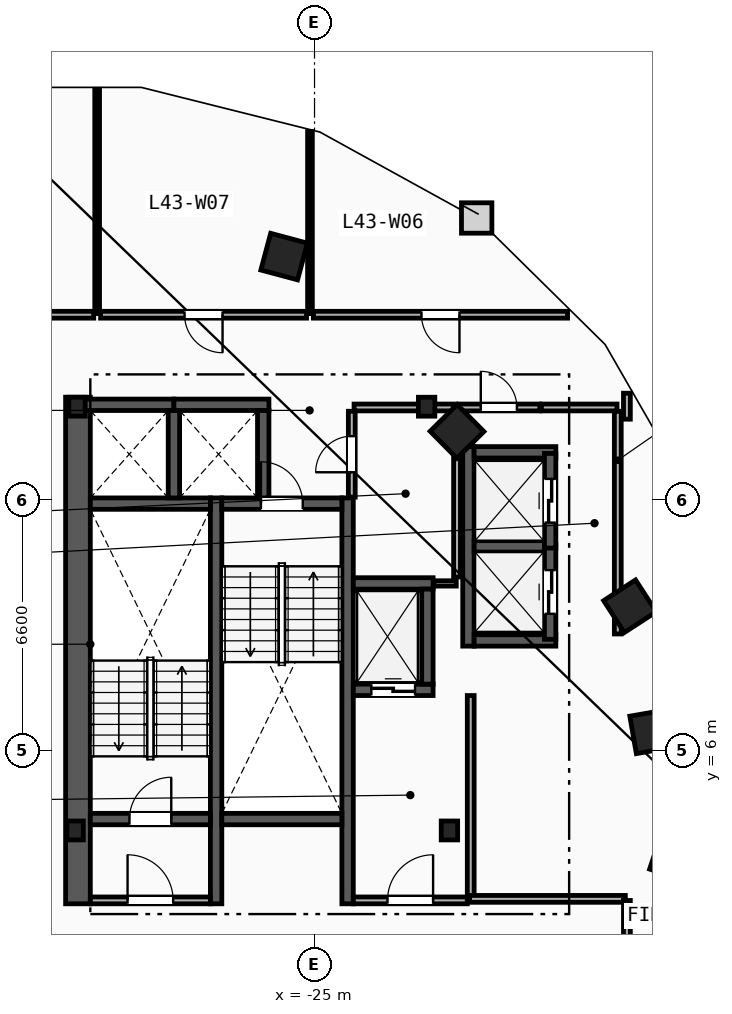
"""IFC4 building model, lengths in metres.
Left out: names, types, materials, properties, quantities, classifications, styles, units other than length and angle.
Written with IfcOpenShell. Run it as: python <this file> out.ifc"""

import sys

from ifc_helpers import new_model, si_unit, direction, frame, frame_2d, origin, origin_2d, place, context, subcontext, project, spatial, rectangle, i_section, extrude, element, fill, save


model = new_model("IFC4")
c1 = context("Model", 3, precision=1e-05, world=origin(), true_north=direction((0.0, 1.0)))
c2 = subcontext(c1, "Body", "Model", "MODEL_VIEW")
j1 = project(units=[si_unit("LENGTHUNIT", "METRE"), si_unit("PLANEANGLEUNIT", "RADIAN")], contexts=[c1])
p1 = place(None, origin())
s1 = spatial("IfcSite", under=j1, at=p1, CompositionType="ELEMENT")
p2 = place(p1, origin())
s2 = spatial("IfcBuilding", under=s1, at=p2, CompositionType="ELEMENT")
p3 = place(p2, frame((0.0, 0.0, 165.6)))
s3 = spatial("IfcBuildingStorey", under=s2, at=p3, CompositionType="ELEMENT", Elevation=165.6)
for number, where, z_axis, x_axis in (
    (1, (-31.3, 3.9, 0.0), (0.0, 0.0, 1.0), (1.0, 0.0, 0.0)),
    (2, (-21.45, 3.9, 0.0), (0.0, 0.0, 1.0), (1.0, 0.0, 0.0)),
    (3, (-22.05, 15.05, 0.0), (0.0, 0.0, 1.0), (1.0, 0.0, 0.0)),
    (4, (-31.25, 15.05, 0.0), (0.0, 0.0, 1.0), (1.0, 0.0, 0.0)),
):
    element("IfcColumn", number, at=place(p3, frame(where, z_axis=z_axis, x_axis=x_axis)), inside=s3, PredefinedType="COLUMN", context=c2, shape_type="SweptSolid", body=[
        extrude(i_section(OverallWidth=0.432, OverallDepth=0.498, WebThickness=0.056, FlangeThickness=0.089, FilletRadius=0.018, at=origin_2d()), origin(), (0.0, 0.0, 1.0), 3.6),
    ])
for number, where, z_axis, x_axis in (
    (5, (-15.55, 3.2, 0.0), (0.0, 0.0, 1.0), (0.315, 0.949, 0.0)),
    (6, (-16.125, 6.5, 0.0), (0.0, 0.0, 1.0), (-0.172, 0.985, 0.0)),
    (7, (-16.7, 9.8, 0.0), (0.0, 0.0, 1.0), (-0.544, 0.839, 0.0)),
    (8, (-21.25, 14.4, 0.0), (0.0, 0.0, 1.0), (-0.703, 0.711, 0.0)),
    (9, (-25.8, 19.0, 0.0), (0.0, 0.0, 1.0), (-0.966, 0.259, 0.0)),
):
    element("IfcColumn", number, at=place(p3, frame(where, z_axis=z_axis, x_axis=x_axis)), inside=s3, PredefinedType="COLUMN", context=c2, shape_type="SweptSolid", body=[
        extrude(rectangle(XDim=1.0, YDim=1.0, at=origin_2d()), origin(), (0.0, 0.0, 1.0), 3.6),
    ])
p4 = place(p3, frame((-31.225, 1.97, 0.0), z_axis=(0.0, 0.0, 1.0), x_axis=(0.0, 1.0, 0.0)))
e10 = element("IfcWall", 10, at=p4, inside=s3, PredefinedType="SHEAR", context=c2, shape_type="SweptSolid", body=[
    extrude(rectangle(XDim=13.33, YDim=0.65, at=frame_2d((6.665, 0.0))), origin(), (0.0, 0.0, 1.0), 3.36),
])
for number, where, z_axis, x_axis in (
    (11, (-27.59, 1.97, 0.0), (0.0, 0.0, 1.0), (0.0, 1.0, 0.0)),
    (12, (-24.13, 1.97, 0.0), (0.0, 0.0, 1.0), (0.0, 1.0, 0.0)),
):
    element("IfcWall", number, at=place(p3, frame(where, z_axis=z_axis, x_axis=x_axis)), inside=s3, PredefinedType="SHEAR", context=c2, shape_type="SweptSolid", body=[
        extrude(rectangle(XDim=10.68, YDim=0.3, at=frame_2d((5.34, 0.0))), origin(), (0.0, 0.0, 1.0), 3.36),
    ])
p5 = place(p3, frame((-30.9, 4.2, 0.0), z_axis=(0.0, 0.0, 1.0), x_axis=(1.0, 0.0, 0.0)))
e13 = element("IfcWall", 13, at=p5, inside=s3, PredefinedType="SHEAR", context=c2, shape_type="SweptSolid", body=[
    extrude(rectangle(XDim=3.16, YDim=0.3, at=frame_2d((1.58, 0.0))), origin(), (0.0, 0.0, 1.0), 3.36),
])
p6 = place(p5, frame((1.03, 0.0, 0.0)))
e14 = element("IfcOpeningElement", 14, at=p6, cuts=e13, PredefinedType="OPENING", context=c2, shape_type="SweptSolid", body=[
    extrude(rectangle(XDim=1.1, YDim=2.15, at=frame_2d((0.55, 1.075))), frame((0.0, 0.16, 0.0), z_axis=(0.0, -1.0, 0.0), x_axis=(1.0, 0.0, 0.0)), (0.0, 0.0, 1.0), 0.32),
])
p7 = place(p3, frame((-30.9, 12.5, 0.0), z_axis=(0.0, 0.0, 1.0), x_axis=(1.0, 0.0, 0.0)))
e15 = element("IfcWall", 15, at=p7, inside=s3, PredefinedType="SHEAR", context=c2, shape_type="SweptSolid", body=[
    extrude(rectangle(XDim=3.16, YDim=0.3, at=frame_2d((1.58, 0.0))), origin(), (0.0, 0.0, 1.0), 3.36),
])
p8 = place(p3, frame((-27.44, 12.5, 0.0), z_axis=(0.0, 0.0, 1.0), x_axis=(1.0, 0.0, 0.0)))
e16 = element("IfcWall", 16, at=p8, inside=s3, PredefinedType="SHEAR", context=c2, shape_type="SweptSolid", body=[
    extrude(rectangle(XDim=3.16, YDim=0.3, at=frame_2d((1.58, 0.0))), origin(), (0.0, 0.0, 1.0), 3.36),
])
p9 = place(p8, frame((1.03, 0.0, 0.0)))
e17 = element("IfcOpeningElement", 17, at=p9, cuts=e16, PredefinedType="OPENING", context=c2, shape_type="SweptSolid", body=[
    extrude(rectangle(XDim=1.1, YDim=2.15, at=frame_2d((0.55, 1.075))), frame((0.0, 0.16, 0.0), z_axis=(0.0, -1.0, 0.0), x_axis=(1.0, 0.0, 0.0)), (0.0, 0.0, 1.0), 0.32),
])
p10 = place(p3, frame((-27.44, 4.2, 0.0), z_axis=(0.0, 0.0, 1.0), x_axis=(1.0, 0.0, 0.0)))
e18 = element("IfcWall", 18, at=p10, inside=s3, PredefinedType="SHEAR", context=c2, shape_type="SweptSolid", body=[
    extrude(rectangle(XDim=3.16, YDim=0.3, at=frame_2d((1.58, 0.0))), origin(), (0.0, 0.0, 1.0), 3.36),
])
p11 = place(p3, frame((-20.89, 2.15, 0.0), z_axis=(0.0, 0.0, 1.0), x_axis=(0.0, 1.0, 0.0)))
e19 = element("IfcWall", 19, at=p11, inside=s3, PredefinedType="PARTITIONING", context=c2, shape_type="SweptSolid", body=[
    extrude(rectangle(XDim=5.3, YDim=0.18, at=frame_2d((2.65, 0.0))), origin(), (0.0, 0.0, 1.0), 3.36),
])
p12 = place(p3, frame((-23.98, 2.06, 0.0), z_axis=(0.0, 0.0, 1.0), x_axis=(1.0, 0.0, 0.0)))
e20 = element("IfcWall", 20, at=p12, inside=s3, PredefinedType="PARTITIONING", context=c2, shape_type="SweptSolid", body=[
    extrude(rectangle(XDim=3.0, YDim=0.18, at=frame_2d((1.5, 0.0))), origin(), (0.0, 0.0, 1.0), 3.36),
])
p13 = place(p12, frame((0.9, 0.0, 0.0)))
e21 = element("IfcOpeningElement", 21, at=p13, cuts=e20, PredefinedType="OPENING", context=c2, shape_type="SweptSolid", body=[
    extrude(rectangle(XDim=1.2, YDim=2.15, at=frame_2d((0.6, 1.075))), frame((0.0, 0.1, 0.0), z_axis=(0.0, -1.0, 0.0), x_axis=(1.0, 0.0, 0.0)), (0.0, 0.0, 1.0), 0.2),
])
p14 = place(p3, frame((-30.9, 2.06, 0.0), z_axis=(0.0, 0.0, 1.0), x_axis=(1.0, 0.0, 0.0)))
e22 = element("IfcWall", 22, at=p14, inside=s3, PredefinedType="PARTITIONING", context=c2, shape_type="SweptSolid", body=[
    extrude(rectangle(XDim=3.16, YDim=0.18, at=frame_2d((1.58, 0.0))), origin(), (0.0, 0.0, 1.0), 3.36),
])
p15 = place(p14, frame((0.98, 0.0, 0.0)))
e23 = element("IfcOpeningElement", 23, at=p15, cuts=e22, PredefinedType="OPENING", context=c2, shape_type="SweptSolid", body=[
    extrude(rectangle(XDim=1.2, YDim=2.15, at=frame_2d((0.6, 1.075))), frame((0.0, 0.1, 0.0), z_axis=(0.0, -1.0, 0.0), x_axis=(1.0, 0.0, 0.0)), (0.0, 0.0, 1.0), 0.2),
])
p16 = place(p3, frame((-23.98, 7.6, 0.0), z_axis=(0.0, 0.0, 1.0), x_axis=(1.0, 0.0, 0.0)))
e24 = element("IfcWall", 24, at=p16, inside=s3, PredefinedType="SHEAR", context=c2, shape_type="SweptSolid", body=[
    extrude(rectangle(XDim=2.1, YDim=0.3, at=frame_2d((1.05, 0.0))), origin(), (0.0, 0.0, 1.0), 3.36),
])
p17 = place(p16, frame((0.475, 0.0, 0.0)))
e25 = element("IfcOpeningElement", 25, at=p17, cuts=e24, PredefinedType="OPENING", context=c2, shape_type="SweptSolid", body=[
    extrude(rectangle(XDim=1.15, YDim=2.2, at=frame_2d((0.575, 1.1))), frame((0.0, 0.16, 0.0), z_axis=(0.0, -1.0, 0.0), x_axis=(1.0, 0.0, 0.0)), (0.0, 0.0, 1.0), 0.32),
])
p18 = place(p3, frame((-23.98, 10.4, 0.0), z_axis=(0.0, 0.0, 1.0), x_axis=(1.0, 0.0, 0.0)))
e26 = element("IfcWall", 26, at=p18, inside=s3, PredefinedType="SHEAR", context=c2, shape_type="SweptSolid", body=[
    extrude(rectangle(XDim=2.1, YDim=0.3, at=frame_2d((1.05, 0.0))), origin(), (0.0, 0.0, 1.0), 3.36),
])
for number, where, z_axis, x_axis in (
    (27, (-22.03, 7.75, 0.0), (0.0, 0.0, 1.0), (0.0, 1.0, 0.0)),
    (28, (-31.2, 15.1, 0.0), (0.0, 0.0, 1.0), (1.0, 0.0, 0.0)),
):
    element("IfcWall", number, at=place(p3, frame(where, z_axis=z_axis, x_axis=x_axis)), inside=s3, PredefinedType="SHEAR", context=c2, shape_type="SweptSolid", body=[
        extrude(rectangle(XDim=2.5, YDim=0.3, at=frame_2d((1.25, 0.0))), origin(), (0.0, 0.0, 1.0), 3.36),
    ])
p19 = place(p3, frame((-28.7, 12.65, 0.0), z_axis=(0.0, 0.0, 1.0), x_axis=(0.0, 1.0, 0.0)))
e29 = element("IfcWall", 29, at=p19, inside=s3, PredefinedType="SHEAR", context=c2, shape_type="SweptSolid", body=[
    extrude(rectangle(XDim=2.3, YDim=0.3, at=frame_2d((1.15, 0.0))), origin(), (0.0, 0.0, 1.0), 3.36),
])
p20 = place(p3, frame((-28.7, 15.1, 0.0), z_axis=(0.0, 0.0, 1.0), x_axis=(1.0, 0.0, 0.0)))
e30 = element("IfcWall", 30, at=p20, inside=s3, PredefinedType="SHEAR", context=c2, shape_type="SweptSolid", body=[
    extrude(rectangle(XDim=2.5, YDim=0.3, at=frame_2d((1.25, 0.0))), origin(), (0.0, 0.0, 1.0), 3.36),
])
p21 = place(p3, frame((-26.35, 12.65, 0.0), z_axis=(0.0, 0.0, 1.0), x_axis=(0.0, 1.0, 0.0)))
e31 = element("IfcWall", 31, at=p21, inside=s3, PredefinedType="SHEAR", context=c2, shape_type="SweptSolid", body=[
    extrude(rectangle(XDim=2.3, YDim=0.3, at=frame_2d((1.15, 0.0))), origin(), (0.0, 0.0, 1.0), 3.36),
])
p22 = place(p3, frame((-20.95, 8.75, 0.0), z_axis=(0.0, 0.0, 1.0), x_axis=(0.0, 1.0, 0.0)))
e32 = element("IfcWall", 32, at=p22, inside=s3, PredefinedType="SHEAR", context=c2, shape_type="SweptSolid", body=[
    extrude(rectangle(XDim=5.25, YDim=0.3, at=frame_2d((2.625, 0.0))), origin(), (0.0, 0.0, 1.0), 3.36),
])
for number, where, z_axis, x_axis in (
    (33, (-20.8, 8.9, 0.0), (0.0, 0.0, 1.0), (1.0, 0.0, 0.0)),
    (34, (-20.8, 13.85, 0.0), (0.0, 0.0, 1.0), (1.0, 0.0, 0.0)),
):
    element("IfcWall", number, at=place(p3, frame(where, z_axis=z_axis, x_axis=x_axis)), inside=s3, PredefinedType="SHEAR", context=c2, shape_type="SweptSolid", body=[
        extrude(rectangle(XDim=2.15, YDim=0.3, at=frame_2d((1.075, 0.0))), origin(), (0.0, 0.0, 1.0), 3.36),
    ])
p23 = place(p3, frame((-20.8, 11.375, 0.0), z_axis=(0.0, 0.0, 1.0), x_axis=(1.0, 0.0, 0.0)))
e35 = element("IfcWall", 35, at=p23, inside=s3, PredefinedType="SHEAR", context=c2, shape_type="SweptSolid", body=[
    extrude(rectangle(XDim=1.85, YDim=0.3, at=frame_2d((0.925, 0.0))), origin(), (0.0, 0.0, 1.0), 3.36),
])
p24 = place(p3, frame((-18.8, 8.93, 0.0), z_axis=(0.0, 0.0, 1.0), x_axis=(0.0, 1.0, 0.0)))
e36 = element("IfcWall", 36, at=p24, inside=s3, PredefinedType="SHEAR", context=c2, shape_type="SweptSolid", body=[
    extrude(rectangle(XDim=2.49, YDim=0.3, at=frame_2d((1.245, 0.0))), origin(), (0.0, 0.0, 1.0), 3.36),
])
p25 = place(p24, frame((0.67, 0.0, 0.0)))
e37 = element("IfcOpeningElement", 37, at=p25, cuts=e36, PredefinedType="OPENING", context=c2, shape_type="SweptSolid", body=[
    extrude(rectangle(XDim=1.15, YDim=2.2, at=frame_2d((0.575, 1.1))), frame((0.0, 0.16, 0.0), z_axis=(0.0, -1.0, 0.0), x_axis=(1.0, 0.0, 0.0)), (0.0, 0.0, 1.0), 0.32),
])
p26 = place(p3, frame((-18.8, 11.33, 0.0), z_axis=(0.0, 0.0, 1.0), x_axis=(0.0, 1.0, 0.0)))
e38 = element("IfcWall", 38, at=p26, inside=s3, PredefinedType="SHEAR", context=c2, shape_type="SweptSolid", body=[
    extrude(rectangle(XDim=2.49, YDim=0.3, at=frame_2d((1.245, 0.0))), origin(), (0.0, 0.0, 1.0), 3.36),
])
p27 = place(p26, frame((0.67, 0.0, 0.0)))
e39 = element("IfcOpeningElement", 39, at=p27, cuts=e38, PredefinedType="OPENING", context=c2, shape_type="SweptSolid", body=[
    extrude(rectangle(XDim=1.15, YDim=2.2, at=frame_2d((0.575, 1.1))), frame((0.0, 0.16, 0.0), z_axis=(0.0, -1.0, 0.0), x_axis=(1.0, 0.0, 0.0)), (0.0, 0.0, 1.0), 0.32),
])
p28 = place(p3, frame((-17.02, 9.07, 0.0), z_axis=(0.0, 0.0, 1.0), x_axis=(0.0, 1.0, 0.0)))
e40 = element("IfcWall", 40, at=p28, inside=s3, PredefinedType="PARTITIONING", context=c2, shape_type="SweptSolid", body=[
    extrude(rectangle(XDim=5.86, YDim=0.18, at=frame_2d((2.93, 0.0))), origin(), (0.0, 0.0, 1.0), 3.36),
])
p29 = place(p3, frame((-21.23, 15.03, 0.0), z_axis=(0.0, 0.0, 1.0), x_axis=(1.0, 0.0, 0.0)))
e41 = element("IfcWall", 41, at=p29, inside=s3, PredefinedType="PARTITIONING", context=c2, shape_type="SweptSolid", body=[
    extrude(rectangle(XDim=2.16, YDim=0.18, at=frame_2d((1.08, 0.0))), origin(), (0.0, 0.0, 1.0), 3.36),
])
p30 = place(p29, frame((0.605, 0.0, 0.0)))
e42 = element("IfcOpeningElement", 42, at=p30, cuts=e41, PredefinedType="OPENING", context=c2, shape_type="SweptSolid", body=[
    extrude(rectangle(XDim=0.95, YDim=2.1, at=frame_2d((0.475, 1.05))), frame((0.0, 0.1, 0.0), z_axis=(0.0, -1.0, 0.0), x_axis=(1.0, 0.0, 0.0)), (0.0, 0.0, 1.0), 0.2),
])
p31 = place(p3, frame((-19.03, 15.03, 0.0), z_axis=(0.0, 0.0, 1.0), x_axis=(1.0, 0.0, 0.0)))
e43 = element("IfcWall", 43, at=p31, inside=s3, PredefinedType="PARTITIONING", context=c2, shape_type="SweptSolid", body=[
    extrude(rectangle(XDim=1.99, YDim=0.18, at=frame_2d((0.995, 0.0))), origin(), (0.0, 0.0, 1.0), 3.36),
])
p32 = place(p3, frame((-21.86, 10.4, 0.0), z_axis=(0.0, 0.0, 1.0), x_axis=(1.0, 0.0, 0.0)))
e44 = element("IfcWall", 44, at=p32, inside=s3, PredefinedType="PARTITIONING", context=c2, shape_type="SweptSolid", body=[
    extrude(rectangle(XDim=0.59, YDim=0.14, at=frame_2d((0.295, 0.0))), origin(), (0.0, 0.0, 1.0), 3.36),
])
p33 = place(p3, frame((-21.25, 10.57, 0.0), z_axis=(0.0, 0.0, 1.0), x_axis=(0.0, 1.0, 0.0)))
e45 = element("IfcWall", 45, at=p33, inside=s3, PredefinedType="PARTITIONING", context=c2, shape_type="SweptSolid", body=[
    extrude(rectangle(XDim=4.36, YDim=0.18, at=frame_2d((2.18, 0.0))), origin(), (0.0, 0.0, 1.0), 3.36),
])
p34 = place(p3, frame((-23.96, 15.03, 0.0), z_axis=(0.0, 0.0, 1.0), x_axis=(1.0, 0.0, 0.0)))
e46 = element("IfcWall", 46, at=p34, inside=s3, PredefinedType="PARTITIONING", context=c2, shape_type="SweptSolid", body=[
    extrude(rectangle(XDim=2.61, YDim=0.18, at=frame_2d((1.305, 0.0))), origin(), (0.0, 0.0, 1.0), 2.433),
])
p35 = place(p3, frame((-24.02, 12.67, 0.0), z_axis=(0.0, 0.0, 1.0), x_axis=(0.0, 1.0, 0.0)))
e47 = element("IfcWall", 47, at=p35, inside=s3, PredefinedType="PARTITIONING", context=c2, shape_type="SweptSolid", body=[
    extrude(rectangle(XDim=2.26, YDim=0.18, at=frame_2d((1.13, 0.0))), origin(), (0.0, 0.0, 1.0), 3.36),
])
p36 = place(p35, frame((0.655, 0.0, 0.0)))
e48 = element("IfcOpeningElement", 48, at=p36, cuts=e47, PredefinedType="OPENING", context=c2, shape_type="SweptSolid", body=[
    extrude(rectangle(XDim=0.95, YDim=2.1, at=frame_2d((0.475, 1.05))), frame((0.0, 0.1, 0.0), z_axis=(0.0, -1.0, 0.0), x_axis=(1.0, 0.0, 0.0)), (0.0, 0.0, 1.0), 0.2),
])
p37 = place(p3, frame((-30.72, 17.5, 0.0), z_axis=(0.0, 0.0, 1.0), x_axis=(0.0, 1.0, 0.0)))
e49 = element("IfcWall", 49, at=p37, inside=s3, PredefinedType="PARTITIONING", context=c2, shape_type="SweptSolid", body=[
    extrude(rectangle(XDim=5.902, YDim=0.125, at=frame_2d((2.951, 0.0))), origin(), (0.0, 0.0, 1.0), 3.36),
])
p38 = place(p3, frame((-25.12, 17.5, 0.0), z_axis=(0.0, 0.0, 1.0), x_axis=(0.0, 1.0, 0.0)))
e50 = element("IfcWall", 50, at=p38, inside=s3, PredefinedType="PARTITIONING", context=c2, shape_type="SweptSolid", body=[
    extrude(rectangle(XDim=4.791, YDim=0.125, at=frame_2d((2.396, 0.0))), origin(), (0.0, 0.0, 1.0), 3.36),
])
p39 = place(p3, frame((-16.822, 2.1, 0.0), z_axis=(0.0, 0.0, 1.0), x_axis=(-1.0, 0.0, 0.0)))
e51 = element("IfcWall", 51, at=p39, inside=s3, PredefinedType="PARTITIONING", context=c2, shape_type="SweptSolid", body=[
    extrude(rectangle(XDim=4.098, YDim=0.18, at=frame_2d((2.049, 0.0))), origin(), (0.0, 0.0, 1.0), 3.36),
])
p40 = place(p3, frame((-16.78, -0.329, 0.0), z_axis=(0.0, 0.0, 1.0), x_axis=(0.0, 1.0, 0.0)))
e52 = element("IfcWall", 52, at=p40, inside=s3, PredefinedType="PARTITIONING", context=c2, shape_type="SweptSolid", body=[
    extrude(rectangle(XDim=2.387, YDim=0.18, at=frame_2d((1.194, 0.0))), origin(), (0.0, 0.0, 1.0), 3.36),
])
p41 = place(p3, frame((-16.78, 14.721, 0.0), z_axis=(0.0, 0.0, 1.0), x_axis=(0.0, 1.0, 0.0)))
e53 = element("IfcWall", 53, at=p41, inside=s3, PredefinedType="PARTITIONING", context=c2, shape_type="SweptSolid", body=[
    extrude(rectangle(XDim=0.684, YDim=0.18, at=frame_2d((0.342, 0.0))), origin(), (0.0, 0.0, 1.0), 3.36),
])
p42 = place(p3, frame((-30.81, 17.47, 0.0), z_axis=(0.0, 0.0, 1.0), x_axis=(-1.0, 0.0, 0.0)))
e54 = element("IfcWall", 54, at=p42, inside=s3, PredefinedType="PARTITIONING", context=c2, shape_type="SweptSolid", body=[
    extrude(rectangle(XDim=2.818, YDim=0.18, at=frame_2d((1.409, 0.0))), origin(), (0.0, 0.0, 1.0), 3.36),
])
p43 = place(p3, frame((-18.342, 17.47, 0.0), z_axis=(0.0, 0.0, 1.0), x_axis=(-1.0, 0.0, 0.0)))
e55 = element("IfcWall", 55, at=p43, inside=s3, PredefinedType="PARTITIONING", context=c2, shape_type="SweptSolid", body=[
    extrude(rectangle(XDim=6.688, YDim=0.18, at=frame_2d((3.344, 0.0))), origin(), (0.0, 0.0, 1.0), 3.36),
])
p44 = place(p43, frame((2.844, 0.0, 0.0)))
e56 = element("IfcOpeningElement", 56, at=p44, cuts=e55, PredefinedType="OPENING", context=c2, shape_type="SweptSolid", body=[
    extrude(rectangle(XDim=1.0, YDim=2.15, at=frame_2d((0.5, 1.075))), frame((0.0, 0.1, 0.0), z_axis=(0.0, -1.0, 0.0), x_axis=(1.0, 0.0, 0.0)), (0.0, 0.0, 1.0), 0.2),
])
p45 = place(p3, frame((-25.21, 17.47, 0.0), z_axis=(0.0, 0.0, 1.0), x_axis=(-1.0, 0.0, 0.0)))
e57 = element("IfcWall", 57, at=p45, inside=s3, PredefinedType="PARTITIONING", context=c2, shape_type="SweptSolid", body=[
    extrude(rectangle(XDim=5.42, YDim=0.18, at=frame_2d((2.71, 0.0))), origin(), (0.0, 0.0, 1.0), 3.36),
])
p46 = place(p45, frame((2.21, 0.0, 0.0)))
e58 = element("IfcOpeningElement", 58, at=p46, cuts=e57, PredefinedType="OPENING", context=c2, shape_type="SweptSolid", body=[
    extrude(rectangle(XDim=1.0, YDim=2.15, at=frame_2d((0.5, 1.075))), frame((0.0, 0.1, 0.0), z_axis=(0.0, -1.0, 0.0), x_axis=(1.0, 0.0, 0.0)), (0.0, 0.0, 1.0), 0.2),
])
p47 = place(p6, origin())
e59 = element("IfcDoor", 59, at=p47, inside=s3, OperationType="SINGLE_SWING_RIGHT", PredefinedType="DOOR", context=c2, shape_type="SweptSolid", body=[
    extrude(rectangle(XDim=1.1, YDim=2.15, at=frame_2d((0.55, 1.075))), frame((0.0, 0.025, 0.0), z_axis=(0.0, -1.0, 0.0), x_axis=(1.0, 0.0, 0.0)), (0.0, 0.0, 1.0), 0.05),
])
fill(e14, e59)
p48 = place(p9, origin())
e60 = element("IfcDoor", 60, at=p48, inside=s3, OperationType="SINGLE_SWING_LEFT", PredefinedType="DOOR", context=c2, shape_type="SweptSolid", body=[
    extrude(rectangle(XDim=1.1, YDim=2.15, at=frame_2d((0.55, 1.075))), frame((0.0, 0.025, 0.0), z_axis=(0.0, -1.0, 0.0), x_axis=(1.0, 0.0, 0.0)), (0.0, 0.0, 1.0), 0.05),
])
fill(e17, e60)
p49 = place(p13, origin())
e61 = element("IfcDoor", 61, at=p49, inside=s3, OperationType="SINGLE_SWING_RIGHT", PredefinedType="DOOR", context=c2, shape_type="SweptSolid", body=[
    extrude(rectangle(XDim=1.2, YDim=2.15, at=frame_2d((0.6, 1.075))), frame((0.0, 0.025, 0.0), z_axis=(0.0, -1.0, 0.0), x_axis=(1.0, 0.0, 0.0)), (0.0, 0.0, 1.0), 0.05),
])
fill(e21, e61)
p50 = place(p15, origin())
e62 = element("IfcDoor", 62, at=p50, inside=s3, OperationType="SINGLE_SWING_LEFT", PredefinedType="DOOR", context=c2, shape_type="SweptSolid", body=[
    extrude(rectangle(XDim=1.2, YDim=2.15, at=frame_2d((0.6, 1.075))), frame((0.0, 0.025, 0.0), z_axis=(0.0, -1.0, 0.0), x_axis=(1.0, 0.0, 0.0)), (0.0, 0.0, 1.0), 0.05),
])
fill(e23, e62)
p51 = place(p17, origin())
e63 = element("IfcDoor", 63, at=p51, inside=s3, OperationType="SLIDING_TO_LEFT", PredefinedType="TRAPDOOR", context=c2, shape_type="SweptSolid", body=[
    extrude(rectangle(XDim=1.15, YDim=2.2, at=frame_2d((0.575, 1.1))), frame((0.0, 0.025, 0.0), z_axis=(0.0, -1.0, 0.0), x_axis=(1.0, 0.0, 0.0)), (0.0, 0.0, 1.0), 0.05),
])
fill(e25, e63)
p52 = place(p25, origin())
e64 = element("IfcDoor", 64, at=p52, inside=s3, OperationType="SLIDING_TO_LEFT", PredefinedType="TRAPDOOR", context=c2, shape_type="SweptSolid", body=[
    extrude(rectangle(XDim=1.15, YDim=2.2, at=frame_2d((0.575, 1.1))), frame((0.0, 0.025, 0.0), z_axis=(0.0, -1.0, 0.0), x_axis=(1.0, 0.0, 0.0)), (0.0, 0.0, 1.0), 0.05),
])
fill(e37, e64)
p53 = place(p27, origin())
e65 = element("IfcDoor", 65, at=p53, inside=s3, OperationType="SLIDING_TO_LEFT", PredefinedType="TRAPDOOR", context=c2, shape_type="SweptSolid", body=[
    extrude(rectangle(XDim=1.15, YDim=2.2, at=frame_2d((0.575, 1.1))), frame((0.0, 0.025, 0.0), z_axis=(0.0, -1.0, 0.0), x_axis=(1.0, 0.0, 0.0)), (0.0, 0.0, 1.0), 0.05),
])
fill(e39, e65)
p54 = place(p44, origin())
e66 = element("IfcDoor", 66, at=p54, inside=s3, OperationType="SINGLE_SWING_LEFT", PredefinedType="DOOR", context=c2, shape_type="SweptSolid", body=[
    extrude(rectangle(XDim=1.0, YDim=2.15, at=frame_2d((0.5, 1.075))), frame((0.0, 0.025, 0.0), z_axis=(0.0, -1.0, 0.0), x_axis=(1.0, 0.0, 0.0)), (0.0, 0.0, 1.0), 0.05),
])
fill(e56, e66)
p55 = place(p46, origin())
e67 = element("IfcDoor", 67, at=p55, inside=s3, OperationType="SINGLE_SWING_LEFT", PredefinedType="DOOR", context=c2, shape_type="SweptSolid", body=[
    extrude(rectangle(XDim=1.0, YDim=2.15, at=frame_2d((0.5, 1.075))), frame((0.0, 0.025, 0.0), z_axis=(0.0, -1.0, 0.0), x_axis=(1.0, 0.0, 0.0)), (0.0, 0.0, 1.0), 0.05),
])
fill(e58, e67)
p56 = place(p36, origin())
e68 = element("IfcDoor", 68, at=p56, inside=s3, OperationType="SINGLE_SWING_LEFT", PredefinedType="DOOR", context=c2, shape_type="SweptSolid", body=[
    extrude(rectangle(XDim=0.95, YDim=2.1, at=frame_2d((0.475, 1.05))), frame((0.0, 0.025, 0.0), z_axis=(0.0, -1.0, 0.0), x_axis=(1.0, 0.0, 0.0)), (0.0, 0.0, 1.0), 0.05),
])
fill(e48, e68)
p57 = place(p30, origin())
e69 = element("IfcDoor", 69, at=p57, inside=s3, OperationType="SINGLE_SWING_LEFT", PredefinedType="DOOR", context=c2, shape_type="SweptSolid", body=[
    extrude(rectangle(XDim=0.95, YDim=2.1, at=frame_2d((0.475, 1.05))), frame((0.0, 0.025, 0.0), z_axis=(0.0, -1.0, 0.0), x_axis=(1.0, 0.0, 0.0)), (0.0, 0.0, 1.0), 0.05),
])
fill(e42, e69)
save(model, sys.argv[1])
